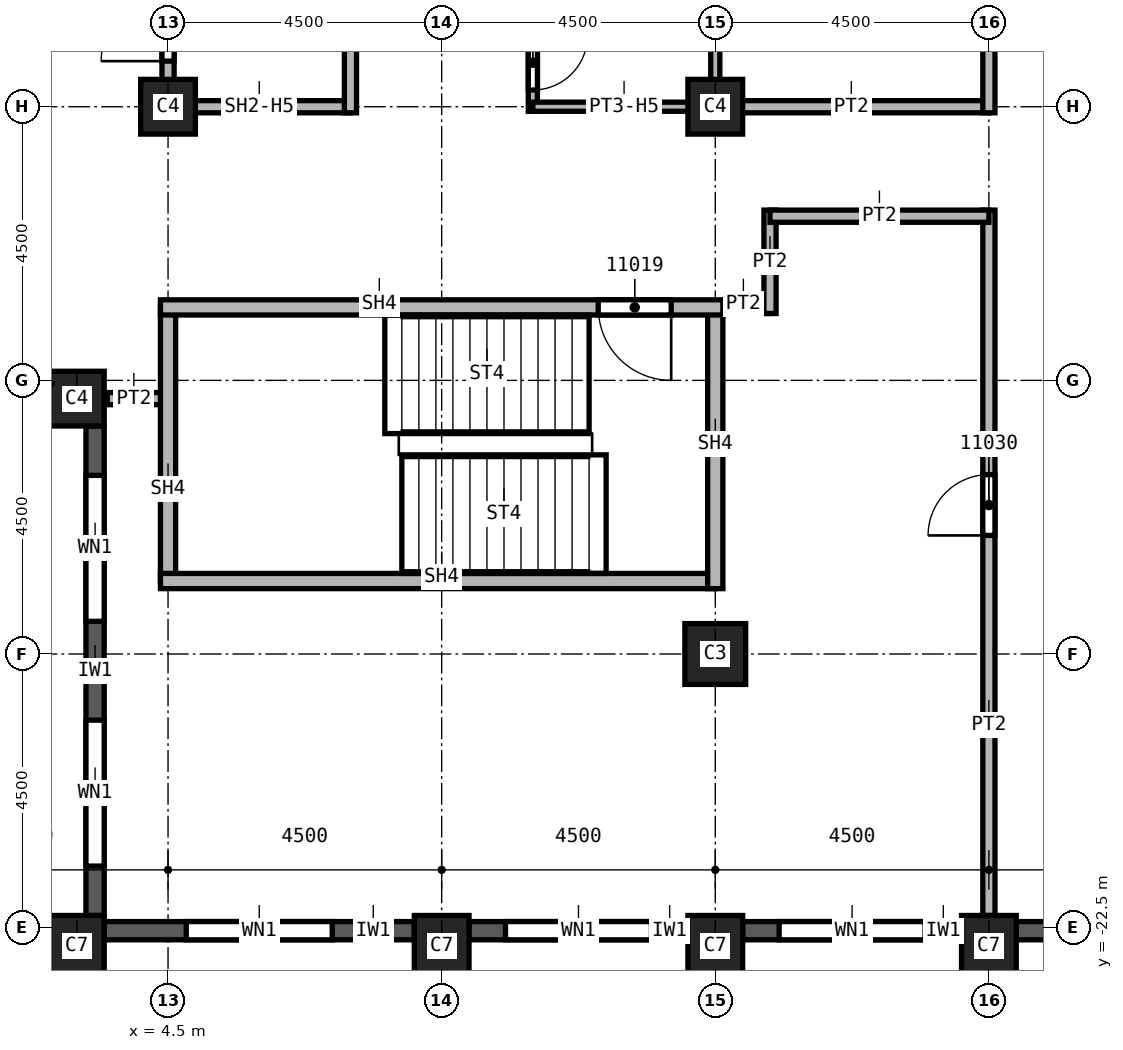
"""IFC4 building model, lengths in metres.
Left out: names, types, materials, properties, quantities, classifications, styles, units other than length and angle.
Written with IfcOpenShell. Run it as: python <this file> out.ifc"""

import sys

from ifc_helpers import new_model, si_unit, direction, frame, frame_2d, origin, origin_2d, place, context, subcontext, project, spatial, rectangle, extrude, element, fill, save


model = new_model("IFC4")
c1 = context("Model", 3, precision=1e-05, world=origin(), true_north=direction((0.0, 1.0)))
c2 = subcontext(c1, "Body", "Model", "MODEL_VIEW")
j1 = project(units=[si_unit("LENGTHUNIT", "METRE"), si_unit("PLANEANGLEUNIT", "RADIAN")], contexts=[c1])
p1 = place(None, origin())
s1 = spatial("IfcSite", under=j1, at=p1, CompositionType="ELEMENT")
p2 = place(p1, origin())
s2 = spatial("IfcBuilding", under=s1, at=p2, CompositionType="ELEMENT")
p3 = place(p2, frame((0.0, 0.0, 188.0)))
s3 = spatial("IfcBuildingStorey", under=s2, at=p3, CompositionType="ELEMENT", Elevation=188.0)
p4 = place(p3, frame((13.5, -18.0, 0.0), z_axis=(0.0, 0.0, 1.0), x_axis=(1.0, 0.0, 0.0)))
e1 = element("IfcColumn", 1, at=p4, inside=s3, PredefinedType="COLUMN", context=c2, shape_type="SweptSolid", body=[
    extrude(rectangle(XDim=1.0, YDim=1.0, at=origin_2d()), origin(), (0.0, 0.0, 1.0), 3.72),
])
for number, where, z_axis, x_axis in (
    (2, (4.5, -9.0, 0.0), (0.0, 0.0, 1.0), (1.0, 0.0, 0.0)),
    (3, (13.5, -9.0, 0.0), (0.0, 0.0, 1.0), (1.0, 0.0, 0.0)),
):
    element("IfcColumn", number, at=place(p3, frame(where, z_axis=z_axis, x_axis=x_axis)), inside=s3, PredefinedType="COLUMN", context=c2, shape_type="SweptSolid", body=[
        extrude(rectangle(XDim=0.9, YDim=0.9, at=origin_2d()), origin(), (0.0, 0.0, 1.0), 3.72),
    ])
for number, where, z_axis, x_axis in (
    (4, (3.0, -22.8, 0.0), (0.0, 0.0, 1.0), (1.0, 0.0, 0.0)),
    (5, (9.0, -22.8, 0.0), (0.0, 0.0, 1.0), (1.0, 0.0, 0.0)),
    (6, (13.5, -22.8, 0.0), (0.0, 0.0, 1.0), (1.0, 0.0, 0.0)),
    (7, (18.0, -22.8, 0.0), (0.0, 0.0, 1.0), (1.0, 0.0, 0.0)),
):
    element("IfcColumn", number, at=place(p3, frame(where, z_axis=z_axis, x_axis=x_axis)), inside=s3, PredefinedType="COLUMN", context=c2, shape_type="SweptSolid", body=[
        extrude(rectangle(XDim=0.9, YDim=1.0, at=origin_2d()), origin(), (0.0, 0.0, 1.0), 3.72),
    ])
p5 = place(p3, frame((3.0, -13.8, 0.0), z_axis=(0.0, 0.0, 1.0), x_axis=(1.0, 0.0, 0.0)))
e8 = element("IfcColumn", 8, at=p5, inside=s3, PredefinedType="COLUMN", context=c2, shape_type="SweptSolid", body=[
    extrude(rectangle(XDim=0.9, YDim=0.9, at=origin_2d()), origin(), (0.0, 0.0, 1.0), 3.72),
])
p6 = place(p3, frame((3.3, -14.25, 0.0), z_axis=(0.0, 0.0, 1.0), x_axis=(0.0, -1.0, 0.0)))
e9 = element("IfcWall", 9, at=p6, inside=s3, PredefinedType="SOLIDWALL", context=c2, shape_type="SweptSolid", body=[
    extrude(rectangle(XDim=8.05, YDim=0.3, at=frame_2d((4.025, 0.0))), origin(), (0.0, 0.0, 1.0), 3.12),
])
p7 = place(p6, frame((0.812, 0.0, 0.8)))
e10 = element("IfcOpeningElement", 10, at=p7, cuts=e9, PredefinedType="OPENING", context=c2, shape_type="SweptSolid", body=[
    extrude(rectangle(XDim=2.4, YDim=1.95, at=frame_2d((1.2, 0.975))), frame((0.0, 0.15, 0.0), z_axis=(0.0, -1.0, 0.0), x_axis=(1.0, 0.0, 0.0)), (0.0, 0.0, 1.0), 0.3),
])
p8 = place(p6, frame((4.837, 0.0, 0.8)))
e11 = element("IfcOpeningElement", 11, at=p8, cuts=e9, PredefinedType="OPENING", context=c2, shape_type="SweptSolid", body=[
    extrude(rectangle(XDim=2.4, YDim=1.95, at=frame_2d((1.2, 0.975))), frame((0.0, 0.15, 0.0), z_axis=(0.0, -1.0, 0.0), x_axis=(1.0, 0.0, 0.0)), (0.0, 0.0, 1.0), 0.3),
])
p9 = place(p3, frame((3.45, -22.55, 0.0), z_axis=(0.0, 0.0, 1.0), x_axis=(1.0, 0.0, 0.0)))
e12 = element("IfcWall", 12, at=p9, inside=s3, PredefinedType="SOLIDWALL", context=c2, shape_type="SweptSolid", body=[
    extrude(rectangle(XDim=5.1, YDim=0.3, at=frame_2d((2.55, 0.0))), origin(), (0.0, 0.0, 1.0), 3.12),
])
p10 = place(p9, frame((1.35, 0.0, 0.8)))
e13 = element("IfcOpeningElement", 13, at=p10, cuts=e12, PredefinedType="OPENING", context=c2, shape_type="SweptSolid", body=[
    extrude(rectangle(XDim=2.4, YDim=1.95, at=frame_2d((1.2, 0.975))), frame((0.0, 0.15, 0.0), z_axis=(0.0, -1.0, 0.0), x_axis=(1.0, 0.0, 0.0)), (0.0, 0.0, 1.0), 0.3),
])
p11 = place(p3, frame((9.45, -22.55, 0.0), z_axis=(0.0, 0.0, 1.0), x_axis=(1.0, 0.0, 0.0)))
e14 = element("IfcWall", 14, at=p11, inside=s3, PredefinedType="SOLIDWALL", context=c2, shape_type="SweptSolid", body=[
    extrude(rectangle(XDim=3.6, YDim=0.3, at=frame_2d((1.8, 0.0))), origin(), (0.0, 0.0, 1.0), 3.12),
])
p12 = place(p11, frame((0.6, 0.0, 0.8)))
e15 = element("IfcOpeningElement", 15, at=p12, cuts=e14, PredefinedType="OPENING", context=c2, shape_type="SweptSolid", body=[
    extrude(rectangle(XDim=2.4, YDim=1.95, at=frame_2d((1.2, 0.975))), frame((0.0, 0.15, 0.0), z_axis=(0.0, -1.0, 0.0), x_axis=(1.0, 0.0, 0.0)), (0.0, 0.0, 1.0), 0.3),
])
p13 = place(p3, frame((13.95, -22.55, 0.0), z_axis=(0.0, 0.0, 1.0), x_axis=(1.0, 0.0, 0.0)))
e16 = element("IfcWall", 16, at=p13, inside=s3, PredefinedType="SOLIDWALL", context=c2, shape_type="SweptSolid", body=[
    extrude(rectangle(XDim=3.6, YDim=0.3, at=frame_2d((1.8, 0.0))), origin(), (0.0, 0.0, 1.0), 3.12),
])
p14 = place(p13, frame((0.6, 0.0, 0.8)))
e17 = element("IfcOpeningElement", 17, at=p14, cuts=e16, PredefinedType="OPENING", context=c2, shape_type="SweptSolid", body=[
    extrude(rectangle(XDim=2.4, YDim=1.95, at=frame_2d((1.2, 0.975))), frame((0.0, 0.15, 0.0), z_axis=(0.0, -1.0, 0.0), x_axis=(1.0, 0.0, 0.0)), (0.0, 0.0, 1.0), 0.3),
])
p15 = place(p3, frame((18.45, -22.55, 0.0), z_axis=(0.0, 0.0, 1.0), x_axis=(1.0, 0.0, 0.0)))
e18 = element("IfcWall", 18, at=p15, inside=s3, PredefinedType="SOLIDWALL", context=c2, shape_type="SweptSolid", body=[
    extrude(rectangle(XDim=3.6, YDim=0.3, at=frame_2d((1.8, 0.0))), origin(), (0.0, 0.0, 1.0), 3.12),
])
p16 = place(p15, frame((0.625, 0.0, 0.8)))
e19 = element("IfcOpeningElement", 19, at=p16, cuts=e18, PredefinedType="OPENING", context=c2, shape_type="SweptSolid", body=[
    extrude(rectangle(XDim=0.6, YDim=1.95, at=frame_2d((0.3, 0.975))), frame((0.0, 0.15, 0.0), z_axis=(0.0, -1.0, 0.0), x_axis=(1.0, 0.0, 0.0)), (0.0, 0.0, 1.0), 0.3),
])
p17 = place(p15, frame((1.825, 0.0, 0.8)))
e20 = element("IfcOpeningElement", 20, at=p17, cuts=e18, PredefinedType="OPENING", context=c2, shape_type="SweptSolid", body=[
    extrude(rectangle(XDim=1.0, YDim=1.95, at=frame_2d((0.5, 0.975))), frame((0.0, 0.15, 0.0), z_axis=(0.0, -1.0, 0.0), x_axis=(1.0, 0.0, 0.0)), (0.0, 0.0, 1.0), 0.3),
])
p18 = place(p3, frame((4.5, -13.8, 0.0), z_axis=(0.0, 0.0, 1.0), x_axis=(-1.0, 0.0, 0.0)))
e21 = element("IfcWall", 21, at=p18, inside=s3, PredefinedType="PARTITIONING", context=c2, shape_type="SweptSolid", body=[
    extrude(rectangle(XDim=1.0, YDim=0.2, at=frame_2d((0.5, 0.0))), origin(), (0.0, 0.0, 1.0), 3.72),
])
p19 = place(p3, frame((13.5, -9.0, 0.0), z_axis=(0.0, 0.0, 1.0), x_axis=(1.0, 0.0, 0.0)))
e22 = element("IfcWall", 22, at=p19, inside=s3, PredefinedType="PARTITIONING", context=c2, shape_type="SweptSolid", body=[
    extrude(rectangle(XDim=4.5, YDim=0.2, at=frame_2d((2.25, 0.0))), origin(), (0.0, 0.0, 1.0), 3.72),
])
p20 = place(p3, frame((14.4, -12.3, 0.0), z_axis=(0.0, 0.0, 1.0), x_axis=(-1.0, 0.0, 0.0)))
e23 = element("IfcWall", 23, at=p20, inside=s3, PredefinedType="PARTITIONING", context=c2, shape_type="SweptSolid", body=[
    extrude(rectangle(XDim=1.025, YDim=0.2, at=frame_2d((0.512, 0.0))), origin(), (0.0, 0.0, 1.0), 3.72),
])
p21 = place(p3, frame((14.4, -10.7, 0.0), z_axis=(0.0, 0.0, 1.0), x_axis=(0.0, -1.0, 0.0)))
e24 = element("IfcWall", 24, at=p21, inside=s3, PredefinedType="PARTITIONING", context=c2, shape_type="SweptSolid", body=[
    extrude(rectangle(XDim=1.7, YDim=0.2, at=frame_2d((0.85, 0.0))), origin(), (0.0, 0.0, 1.0), 3.72),
])
p22 = place(p3, frame((18.0, -22.3, 0.0), z_axis=(0.0, 0.0, 1.0), x_axis=(0.0, 1.0, 0.0)))
e25 = element("IfcWall", 25, at=p22, inside=s3, PredefinedType="PARTITIONING", context=c2, shape_type="SweptSolid", body=[
    extrude(rectangle(XDim=11.6, YDim=0.2, at=frame_2d((5.8, 0.0))), origin(), (0.0, 0.0, 1.0), 3.72),
])
p23 = place(p22, frame((6.25, 0.0, 0.0)))
e26 = element("IfcOpeningElement", 26, at=p23, cuts=e25, PredefinedType="OPENING", context=c2, shape_type="SweptSolid", body=[
    extrude(rectangle(XDim=1.0, YDim=2.1, at=frame_2d((0.5, 1.05))), frame((0.0, 0.1, 0.0), z_axis=(0.0, -1.0, 0.0), x_axis=(1.0, 0.0, 0.0)), (0.0, 0.0, 1.0), 0.2),
])
p24 = place(p3, frame((18.0, -10.8, 0.0), z_axis=(0.0, 0.0, 1.0), x_axis=(-1.0, 0.0, 0.0)))
e27 = element("IfcWall", 27, at=p24, inside=s3, PredefinedType="PARTITIONING", context=c2, shape_type="SweptSolid", body=[
    extrude(rectangle(XDim=3.6, YDim=0.2, at=frame_2d((1.8, 0.0))), origin(), (0.0, 0.0, 1.0), 3.72),
])
p25 = place(p3, frame((18.0, -9.1, 0.0), z_axis=(0.0, 0.0, 1.0), x_axis=(0.0, 1.0, 0.0)))
e28 = element("IfcWall", 28, at=p25, inside=s3, PredefinedType="PARTITIONING", context=c2, shape_type="SweptSolid", body=[
    extrude(rectangle(XDim=18.2, YDim=0.2, at=frame_2d((9.1, 0.0))), origin(), (0.0, 0.0, 1.0), 3.72),
])
p26 = place(p25, frame((2.8, 0.0, 0.0)))
e29 = element("IfcOpeningElement", 29, at=p26, cuts=e28, PredefinedType="OPENING", context=c2, shape_type="SweptSolid", body=[
    extrude(rectangle(XDim=1.0, YDim=2.1, at=frame_2d((0.5, 1.05))), frame((0.0, 0.1, 0.0), z_axis=(0.0, -1.0, 0.0), x_axis=(1.0, 0.0, 0.0)), (0.0, 0.0, 1.0), 0.2),
])
p27 = place(p25, frame((8.65, 0.0, 0.0)))
e30 = element("IfcOpeningElement", 30, at=p27, cuts=e28, PredefinedType="OPENING", context=c2, shape_type="SweptSolid", body=[
    extrude(rectangle(XDim=1.0, YDim=2.1, at=frame_2d((0.5, 1.05))), frame((0.0, 0.1, 0.0), z_axis=(0.0, -1.0, 0.0), x_axis=(1.0, 0.0, 0.0)), (0.0, 0.0, 1.0), 0.2),
])
p28 = place(p25, frame((14.5, 0.0, 0.0)))
e31 = element("IfcOpeningElement", 31, at=p28, cuts=e28, PredefinedType="OPENING", context=c2, shape_type="SweptSolid", body=[
    extrude(rectangle(XDim=1.0, YDim=2.1, at=frame_2d((0.5, 1.05))), frame((0.0, 0.1, 0.0), z_axis=(0.0, -1.0, 0.0), x_axis=(1.0, 0.0, 0.0)), (0.0, 0.0, 1.0), 0.2),
])
p29 = place(p3, frame((4.5, -9.1, 0.0), z_axis=(0.0, 0.0, 1.0), x_axis=(0.0, 1.0, 0.0)))
e32 = element("IfcWall", 32, at=p29, inside=s3, PredefinedType="SOLIDWALL", context=c2, shape_type="SweptSolid", body=[
    extrude(rectangle(XDim=3.1, YDim=0.2, at=frame_2d((1.55, 0.0))), origin(), (0.0, 0.0, 1.0), 2.958),
])
p30 = place(p29, frame((0.85, 0.0, 0.0)))
e33 = element("IfcOpeningElement", 33, at=p30, cuts=e32, PredefinedType="OPENING", context=c2, shape_type="SweptSolid", body=[
    extrude(rectangle(XDim=1.1, YDim=2.1, at=frame_2d((0.55, 1.05))), frame((0.0, 0.1, 0.0), z_axis=(0.0, -1.0, 0.0), x_axis=(1.0, 0.0, 0.0)), (0.0, 0.0, 1.0), 0.2),
])
p31 = place(p3, frame((7.5, -9.0, 0.0), z_axis=(0.0, 0.0, 1.0), x_axis=(-1.0, 0.0, 0.0)))
e34 = element("IfcWall", 34, at=p31, inside=s3, PredefinedType="SOLIDWALL", context=c2, shape_type="SweptSolid", body=[
    extrude(rectangle(XDim=3.0, YDim=0.2, at=frame_2d((1.5, 0.0))), origin(), (0.0, 0.0, 1.0), 2.958),
])
p32 = place(p3, frame((7.5, -6.0, 0.0), z_axis=(0.0, 0.0, 1.0), x_axis=(0.0, -1.0, 0.0)))
e35 = element("IfcWall", 35, at=p32, inside=s3, PredefinedType="SOLIDWALL", context=c2, shape_type="SweptSolid", body=[
    extrude(rectangle(XDim=3.1, YDim=0.2, at=frame_2d((1.55, 0.0))), origin(), (0.0, 0.0, 1.0), 3.72),
])
p33 = place(p3, frame((4.5, -16.8, 0.0), z_axis=(0.0, 0.0, 1.0), x_axis=(0.0, 1.0, 0.0)))
e36 = element("IfcWall", 36, at=p33, inside=s3, PredefinedType="SOLIDWALL", context=c2, shape_type="SweptSolid", body=[
    extrude(rectangle(XDim=4.5, YDim=0.25, at=frame_2d((2.25, 0.0))), origin(), (0.0, 0.0, 1.0), 3.72),
])
p34 = place(p3, frame((13.5, -16.8, 0.0), z_axis=(0.0, 0.0, 1.0), x_axis=(-1.0, 0.0, 0.0)))
e37 = element("IfcWall", 37, at=p34, inside=s3, PredefinedType="SOLIDWALL", context=c2, shape_type="SweptSolid", body=[
    extrude(rectangle(XDim=9.125, YDim=0.25, at=frame_2d((4.562, 0.0))), origin(), (0.0, 0.0, 1.0), 3.72),
])
p35 = place(p3, frame((13.5, -12.3, 0.0), z_axis=(0.0, 0.0, 1.0), x_axis=(0.0, -1.0, 0.0)))
e38 = element("IfcWall", 38, at=p35, inside=s3, PredefinedType="SOLIDWALL", context=c2, shape_type="SweptSolid", body=[
    extrude(rectangle(XDim=4.625, YDim=0.25, at=frame_2d((2.312, 0.0))), origin(), (0.0, 0.0, 1.0), 3.72),
])
p36 = place(p3, frame((13.625, -12.3, 0.0), z_axis=(0.0, 0.0, 1.0), x_axis=(-1.0, 0.0, 0.0)))
e39 = element("IfcWall", 39, at=p36, inside=s3, PredefinedType="SOLIDWALL", context=c2, shape_type="SweptSolid", body=[
    extrude(rectangle(XDim=9.25, YDim=0.25, at=frame_2d((4.625, 0.0))), origin(), (0.0, 0.0, 1.0), 3.72),
])
p37 = place(p36, frame((0.85, 0.0, 0.0)))
e40 = element("IfcOpeningElement", 40, at=p37, cuts=e39, PredefinedType="OPENING", context=c2, shape_type="SweptSolid", body=[
    extrude(rectangle(XDim=1.2, YDim=2.1, at=frame_2d((0.6, 1.05))), frame((0.0, 0.125, 0.0), z_axis=(0.0, -1.0, 0.0), x_axis=(1.0, 0.0, 0.0)), (0.0, 0.0, 1.0), 0.25),
])
p38 = place(p3, frame((10.5, -5.925, 0.0), z_axis=(0.0, 0.0, 1.0), x_axis=(0.0, -1.0, 0.0)))
e41 = element("IfcWall", 41, at=p38, inside=s3, PredefinedType="PARTITIONING", context=c2, shape_type="SweptSolid", body=[
    extrude(rectangle(XDim=3.15, YDim=0.15, at=frame_2d((1.575, 0.0))), origin(), (0.0, 0.0, 1.0), 3.72),
])
p39 = place(p38, frame((1.9, 0.0, 0.0)))
e42 = element("IfcOpeningElement", 42, at=p39, cuts=e41, PredefinedType="OPENING", context=c2, shape_type="SweptSolid", body=[
    extrude(rectangle(XDim=0.9, YDim=2.1, at=frame_2d((0.45, 1.05))), frame((0.0, 0.075, 0.0), z_axis=(0.0, -1.0, 0.0), x_axis=(1.0, 0.0, 0.0)), (0.0, 0.0, 1.0), 0.15),
])
p40 = place(p3, frame((13.5, -6.0, 0.0), z_axis=(0.0, 0.0, 1.0), x_axis=(0.0, -1.0, 0.0)))
e43 = element("IfcWall", 43, at=p40, inside=s3, PredefinedType="PARTITIONING", context=c2, shape_type="SweptSolid", body=[
    extrude(rectangle(XDim=3.1, YDim=0.15, at=frame_2d((1.55, 0.0))), origin(), (0.0, 0.0, 1.0), 2.958),
])
p41 = place(p3, frame((13.575, -9.0, 0.0), z_axis=(0.0, 0.0, 1.0), x_axis=(-1.0, 0.0, 0.0)))
e44 = element("IfcWall", 44, at=p41, inside=s3, PredefinedType="PARTITIONING", context=c2, shape_type="SweptSolid", body=[
    extrude(rectangle(XDim=3.075, YDim=0.15, at=frame_2d((1.538, 0.0))), origin(), (0.0, 0.0, 1.0), 2.958),
])
p42 = place(p7, origin())
e45 = element("IfcWindow", 45, at=p42, inside=s3, PartitioningType="SINGLE_PANEL", PredefinedType="WINDOW", context=c2, shape_type="SweptSolid", body=[
    extrude(rectangle(XDim=2.4, YDim=1.95, at=frame_2d((1.2, 0.975))), frame((0.0, 0.03, 0.0), z_axis=(0.0, -1.0, 0.0), x_axis=(1.0, 0.0, 0.0)), (0.0, 0.0, 1.0), 0.06),
])
fill(e10, e45)
p43 = place(p8, origin())
e46 = element("IfcWindow", 46, at=p43, inside=s3, PartitioningType="SINGLE_PANEL", PredefinedType="WINDOW", context=c2, shape_type="SweptSolid", body=[
    extrude(rectangle(XDim=2.4, YDim=1.95, at=frame_2d((1.2, 0.975))), frame((0.0, 0.03, 0.0), z_axis=(0.0, -1.0, 0.0), x_axis=(1.0, 0.0, 0.0)), (0.0, 0.0, 1.0), 0.06),
])
fill(e11, e46)
p44 = place(p10, origin())
e47 = element("IfcWindow", 47, at=p44, inside=s3, PartitioningType="SINGLE_PANEL", PredefinedType="WINDOW", context=c2, shape_type="SweptSolid", body=[
    extrude(rectangle(XDim=2.4, YDim=1.95, at=frame_2d((1.2, 0.975))), frame((0.0, 0.03, 0.0), z_axis=(0.0, -1.0, 0.0), x_axis=(1.0, 0.0, 0.0)), (0.0, 0.0, 1.0), 0.06),
])
fill(e13, e47)
p45 = place(p12, origin())
e48 = element("IfcWindow", 48, at=p45, inside=s3, PartitioningType="SINGLE_PANEL", PredefinedType="WINDOW", context=c2, shape_type="SweptSolid", body=[
    extrude(rectangle(XDim=2.4, YDim=1.95, at=frame_2d((1.2, 0.975))), frame((0.0, 0.03, 0.0), z_axis=(0.0, -1.0, 0.0), x_axis=(1.0, 0.0, 0.0)), (0.0, 0.0, 1.0), 0.06),
])
fill(e15, e48)
p46 = place(p14, origin())
e49 = element("IfcWindow", 49, at=p46, inside=s3, PartitioningType="SINGLE_PANEL", PredefinedType="WINDOW", context=c2, shape_type="SweptSolid", body=[
    extrude(rectangle(XDim=2.4, YDim=1.95, at=frame_2d((1.2, 0.975))), frame((0.0, 0.03, 0.0), z_axis=(0.0, -1.0, 0.0), x_axis=(1.0, 0.0, 0.0)), (0.0, 0.0, 1.0), 0.06),
])
fill(e17, e49)
p47 = place(p30, origin())
e50 = element("IfcDoor", 50, at=p47, inside=s3, OperationType="SINGLE_SWING_RIGHT", PredefinedType="DOOR", context=c2, shape_type="SweptSolid", body=[
    extrude(rectangle(XDim=1.1, YDim=2.1, at=frame_2d((0.55, 1.05))), frame((0.0, 0.025, 0.0), z_axis=(0.0, -1.0, 0.0), x_axis=(1.0, 0.0, 0.0)), (0.0, 0.0, 1.0), 0.05),
])
fill(e33, e50)
p48 = place(p39, origin())
e51 = element("IfcDoor", 51, at=p48, inside=s3, OperationType="SINGLE_SWING_RIGHT", PredefinedType="DOOR", context=c2, shape_type="SweptSolid", body=[
    extrude(rectangle(XDim=0.9, YDim=2.1, at=frame_2d((0.45, 1.05))), frame((0.0, 0.025, 0.0), z_axis=(0.0, -1.0, 0.0), x_axis=(1.0, 0.0, 0.0)), (0.0, 0.0, 1.0), 0.05),
])
fill(e42, e51)
p49 = place(p37, origin())
e52 = element("IfcDoor", 52, at=p49, inside=s3, OperationType="SINGLE_SWING_RIGHT", PredefinedType="DOOR", context=c2, shape_type="SweptSolid", body=[
    extrude(rectangle(XDim=1.2, YDim=2.1, at=frame_2d((0.6, 1.05))), frame((0.0, 0.025, 0.0), z_axis=(0.0, -1.0, 0.0), x_axis=(1.0, 0.0, 0.0)), (0.0, 0.0, 1.0), 0.05),
])
fill(e40, e52)
p50 = place(p23, origin())
e53 = element("IfcDoor", 53, at=p50, inside=s3, OperationType="SINGLE_SWING_LEFT", PredefinedType="DOOR", context=c2, shape_type="SweptSolid", body=[
    extrude(rectangle(XDim=1.0, YDim=2.1, at=frame_2d((0.5, 1.05))), frame((0.0, 0.025, 0.0), z_axis=(0.0, -1.0, 0.0), x_axis=(1.0, 0.0, 0.0)), (0.0, 0.0, 1.0), 0.05),
])
fill(e26, e53)
save(model, sys.argv[1])
